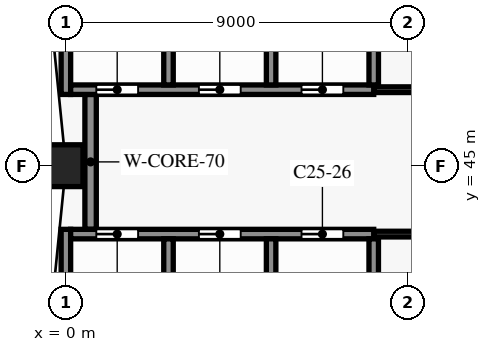
"""IFC4 building model, lengths in metres.
Left out: names, types, materials, properties, quantities, classifications, styles, units other than length and angle.
Written with IfcOpenShell. Run it as: python <this file> out.ifc"""

import sys

from ifc_helpers import new_model, si_unit, direction, frame, frame_2d, origin, origin_2d, place, context, subcontext, project, spatial, rectangle, extrude, element, fill, save


model = new_model("IFC4")
c1 = context("Model", 3, precision=1e-05, world=origin(), true_north=direction((0.0, 1.0)))
c2 = subcontext(c1, "Body", "Model", "MODEL_VIEW")
j1 = project(units=[si_unit("LENGTHUNIT", "METRE"), si_unit("PLANEANGLEUNIT", "RADIAN")], contexts=[c1])
p1 = place(None, origin())
s1 = spatial("IfcSite", under=j1, at=p1, CompositionType="ELEMENT")
p2 = place(p1, origin())
s2 = spatial("IfcBuilding", under=s1, at=p2, CompositionType="ELEMENT")
p3 = place(p2, frame((0.0, 0.0, 189.0)))
s3 = spatial("IfcBuildingStorey", under=s2, at=p3, CompositionType="ELEMENT", Elevation=189.0)
p4 = place(p3, frame((0.0, 45.0, 0.0), z_axis=(0.0, 0.0, 1.0), x_axis=(0.0, -1.0, 0.0)))
e1 = element("IfcColumn", 1, at=p4, inside=s3, PredefinedType="COLUMN", context=c2, shape_type="SweptSolid", body=[
    extrude(rectangle(XDim=0.9, YDim=1.1, at=origin_2d()), origin(), (0.0, 0.0, 1.0), 3.8),
])
p5 = place(p3, frame((8.1, 43.2, 0.0), z_axis=(0.0, 0.0, 1.0), x_axis=(1.0, 0.0, 0.0)))
e2 = element("IfcWall", 2, at=p5, inside=s3, PredefinedType="PARTITIONING", context=c2, shape_type="SweptSolid", body=[
    extrude(rectangle(XDim=16.125, YDim=0.15, at=frame_2d((8.062, 0.0))), origin(), (0.0, 0.0, 1.0), 3.35),
])
p6 = place(p5, frame((1.925, 0.0, 0.0)))
e3 = element("IfcOpeningElement", 3, at=p6, cuts=e2, PredefinedType="OPENING", context=c2, shape_type="SweptSolid", body=[
    extrude(rectangle(XDim=0.9, YDim=2.1, at=frame_2d((0.45, 1.05))), frame((0.0, 0.085, 0.0), z_axis=(0.0, -1.0, 0.0), x_axis=(1.0, 0.0, 0.0)), (0.0, 0.0, 1.0), 0.17),
])
p7 = place(p5, frame((10.025, 0.0, 0.0)))
e4 = element("IfcOpeningElement", 4, at=p7, cuts=e2, PredefinedType="OPENING", context=c2, shape_type="SweptSolid", body=[
    extrude(rectangle(XDim=0.9, YDim=2.1, at=frame_2d((0.45, 1.05))), frame((0.0, 0.085, 0.0), z_axis=(0.0, -1.0, 0.0), x_axis=(1.0, 0.0, 0.0)), (0.0, 0.0, 1.0), 0.17),
])
p8 = place(p3, frame((0.125, 43.2, 0.0), z_axis=(0.0, 0.0, 1.0), x_axis=(1.0, 0.0, 0.0)))
e5 = element("IfcWall", 5, at=p8, inside=s3, PredefinedType="SHEAR", context=c2, shape_type="SweptSolid", body=[
    extrude(rectangle(XDim=7.975, YDim=0.25, at=frame_2d((3.988, 0.0))), origin(), (0.0, 0.0, 1.0), 3.5),
])
p9 = place(p8, frame((0.675, 0.0, 0.0)))
e6 = element("IfcOpeningElement", 6, at=p9, cuts=e5, PredefinedType="OPENING", context=c2, shape_type="SweptSolid", body=[
    extrude(rectangle(XDim=1.1, YDim=2.1, at=frame_2d((0.55, 1.05))), frame((0.0, 0.135, 0.0), z_axis=(0.0, -1.0, 0.0), x_axis=(1.0, 0.0, 0.0)), (0.0, 0.0, 1.0), 0.27),
])
p10 = place(p8, frame((3.375, 0.0, 0.0)))
e7 = element("IfcOpeningElement", 7, at=p10, cuts=e5, PredefinedType="OPENING", context=c2, shape_type="SweptSolid", body=[
    extrude(rectangle(XDim=1.1, YDim=2.1, at=frame_2d((0.55, 1.05))), frame((0.0, 0.135, 0.0), z_axis=(0.0, -1.0, 0.0), x_axis=(1.0, 0.0, 0.0)), (0.0, 0.0, 1.0), 0.27),
])
p11 = place(p8, frame((6.075, 0.0, 0.0)))
e8 = element("IfcOpeningElement", 8, at=p11, cuts=e5, PredefinedType="OPENING", context=c2, shape_type="SweptSolid", body=[
    extrude(rectangle(XDim=1.1, YDim=2.1, at=frame_2d((0.55, 1.05))), frame((0.0, 0.135, 0.0), z_axis=(0.0, -1.0, 0.0), x_axis=(1.0, 0.0, 0.0)), (0.0, 0.0, 1.0), 0.27),
])
p12 = place(p3, frame((8.1, 47.0, 0.0), z_axis=(0.0, 0.0, 1.0), x_axis=(1.0, 0.0, 0.0)))
e9 = element("IfcWall", 9, at=p12, inside=s3, PredefinedType="PARTITIONING", context=c2, shape_type="SweptSolid", body=[
    extrude(rectangle(XDim=13.5, YDim=0.15, at=frame_2d((6.75, 0.0))), origin(), (0.0, 0.0, 1.0), 3.35),
])
p13 = place(p12, frame((1.525, 0.0, 0.0)))
e10 = element("IfcOpeningElement", 10, at=p13, cuts=e9, PredefinedType="OPENING", context=c2, shape_type="SweptSolid", body=[
    extrude(rectangle(XDim=0.9, YDim=2.1, at=frame_2d((0.45, 1.05))), frame((0.0, 0.085, 0.0), z_axis=(0.0, -1.0, 0.0), x_axis=(1.0, 0.0, 0.0)), (0.0, 0.0, 1.0), 0.17),
])
p14 = place(p12, frame((8.275, 0.0, 0.0)))
e11 = element("IfcOpeningElement", 11, at=p14, cuts=e9, PredefinedType="OPENING", context=c2, shape_type="SweptSolid", body=[
    extrude(rectangle(XDim=0.9, YDim=2.1, at=frame_2d((0.45, 1.05))), frame((0.0, 0.085, 0.0), z_axis=(0.0, -1.0, 0.0), x_axis=(1.0, 0.0, 0.0)), (0.0, 0.0, 1.0), 0.17),
])
p15 = place(p3, frame((0.125, 47.0, 0.0), z_axis=(0.0, 0.0, 1.0), x_axis=(1.0, 0.0, 0.0)))
e12 = element("IfcWall", 12, at=p15, inside=s3, PredefinedType="SHEAR", context=c2, shape_type="SweptSolid", body=[
    extrude(rectangle(XDim=7.975, YDim=0.25, at=frame_2d((3.988, 0.0))), origin(), (0.0, 0.0, 1.0), 3.5),
])
p16 = place(p15, frame((0.675, 0.0, 0.0)))
e13 = element("IfcOpeningElement", 13, at=p16, cuts=e12, PredefinedType="OPENING", context=c2, shape_type="SweptSolid", body=[
    extrude(rectangle(XDim=1.1, YDim=2.1, at=frame_2d((0.55, 1.05))), frame((0.0, 0.135, 0.0), z_axis=(0.0, -1.0, 0.0), x_axis=(1.0, 0.0, 0.0)), (0.0, 0.0, 1.0), 0.27),
])
p17 = place(p15, frame((3.375, 0.0, 0.0)))
e14 = element("IfcOpeningElement", 14, at=p17, cuts=e12, PredefinedType="OPENING", context=c2, shape_type="SweptSolid", body=[
    extrude(rectangle(XDim=1.1, YDim=2.1, at=frame_2d((0.55, 1.05))), frame((0.0, 0.135, 0.0), z_axis=(0.0, -1.0, 0.0), x_axis=(1.0, 0.0, 0.0)), (0.0, 0.0, 1.0), 0.27),
])
p18 = place(p15, frame((6.075, 0.0, 0.0)))
e15 = element("IfcOpeningElement", 15, at=p18, cuts=e12, PredefinedType="OPENING", context=c2, shape_type="SweptSolid", body=[
    extrude(rectangle(XDim=1.1, YDim=2.1, at=frame_2d((0.55, 1.05))), frame((0.0, 0.135, 0.0), z_axis=(0.0, -1.0, 0.0), x_axis=(1.0, 0.0, 0.0)), (0.0, 0.0, 1.0), 0.27),
])
p19 = place(p3, frame((0.0, 40.0, 0.0), z_axis=(0.0, 0.0, 1.0), x_axis=(0.0, 1.0, 0.0)))
e16 = element("IfcWall", 16, at=p19, inside=s3, PredefinedType="SHEAR", context=c2, shape_type="SweptSolid", body=[
    extrude(rectangle(XDim=3.325, YDim=0.25, at=frame_2d((1.663, 0.0))), origin(), (0.0, 0.0, 1.0), 3.5),
])
p20 = place(p3, frame((0.0, 46.875, 0.0), z_axis=(0.0, 0.0, 1.0), x_axis=(0.0, 1.0, 0.0)))
e17 = element("IfcWall", 17, at=p20, inside=s3, PredefinedType="SHEAR", context=c2, shape_type="SweptSolid", body=[
    extrude(rectangle(XDim=3.475, YDim=0.25, at=frame_2d((1.738, 0.0))), origin(), (0.0, 0.0, 1.0), 3.5),
])
p21 = place(p3, frame((0.65, 43.325, 0.0), z_axis=(0.0, 0.0, 1.0), x_axis=(0.0, 1.0, 0.0)))
e18 = element("IfcWall", 18, at=p21, inside=s3, PredefinedType="SHEAR", context=c2, shape_type="SweptSolid", body=[
    extrude(rectangle(XDim=3.55, YDim=0.3, at=frame_2d((1.775, 0.0))), origin(), (0.0, 0.0, 1.0), 3.5),
])
for number, where, z_axis, x_axis in (
    (19, (2.7, 40.125, 0.0), (0.0, 0.0, 1.0), (0.0, 1.0, 0.0)),
    (20, (2.7, 47.125, 0.0), (0.0, 0.0, 1.0), (0.0, 1.0, 0.0)),
    (21, (5.4, 40.125, 0.0), (0.0, 0.0, 1.0), (0.0, 1.0, 0.0)),
    (22, (5.4, 47.125, 0.0), (0.0, 0.0, 1.0), (0.0, 1.0, 0.0)),
    (23, (8.1, 40.125, 0.0), (0.0, 0.0, 1.0), (0.0, 1.0, 0.0)),
):
    element("IfcWall", number, at=place(p3, frame(where, z_axis=z_axis, x_axis=x_axis)), inside=s3, PredefinedType="SHEAR", context=c2, shape_type="SweptSolid", body=[
        extrude(rectangle(XDim=2.95, YDim=0.25, at=frame_2d((1.475, 0.0))), origin(), (0.0, 0.0, 1.0), 3.5),
    ])
p22 = place(p3, frame((8.1, 47.125, 0.0), z_axis=(0.0, 0.0, 1.0), x_axis=(0.0, 1.0, 0.0)))
e24 = element("IfcWall", 24, at=p22, inside=s3, PredefinedType="SHEAR", context=c2, shape_type="SweptSolid", body=[
    extrude(rectangle(XDim=3.075, YDim=0.25, at=frame_2d((1.538, 0.0))), origin(), (0.0, 0.0, 1.0), 3.5),
])
p23 = place(p9, origin())
e25 = element("IfcDoor", 25, at=p23, inside=s3, OperationType="DOUBLE_DOOR_SLIDING", PredefinedType="DOOR", context=c2, shape_type="SweptSolid", body=[
    extrude(rectangle(XDim=1.1, YDim=2.1, at=frame_2d((0.55, 1.05))), frame((0.0, 0.025, 0.0), z_axis=(0.0, -1.0, 0.0), x_axis=(1.0, 0.0, 0.0)), (0.0, 0.0, 1.0), 0.05),
])
fill(e6, e25)
p24 = place(p10, origin())
e26 = element("IfcDoor", 26, at=p24, inside=s3, OperationType="DOUBLE_DOOR_SLIDING", PredefinedType="DOOR", context=c2, shape_type="SweptSolid", body=[
    extrude(rectangle(XDim=1.1, YDim=2.1, at=frame_2d((0.55, 1.05))), frame((0.0, 0.025, 0.0), z_axis=(0.0, -1.0, 0.0), x_axis=(1.0, 0.0, 0.0)), (0.0, 0.0, 1.0), 0.05),
])
fill(e7, e26)
p25 = place(p11, origin())
e27 = element("IfcDoor", 27, at=p25, inside=s3, OperationType="DOUBLE_DOOR_SLIDING", PredefinedType="DOOR", context=c2, shape_type="SweptSolid", body=[
    extrude(rectangle(XDim=1.1, YDim=2.1, at=frame_2d((0.55, 1.05))), frame((0.0, 0.025, 0.0), z_axis=(0.0, -1.0, 0.0), x_axis=(1.0, 0.0, 0.0)), (0.0, 0.0, 1.0), 0.05),
])
fill(e8, e27)
p26 = place(p16, origin())
e28 = element("IfcDoor", 28, at=p26, inside=s3, OperationType="DOUBLE_DOOR_SLIDING", PredefinedType="DOOR", context=c2, shape_type="SweptSolid", body=[
    extrude(rectangle(XDim=1.1, YDim=2.1, at=frame_2d((0.55, 1.05))), frame((0.0, 0.025, 0.0), z_axis=(0.0, -1.0, 0.0), x_axis=(1.0, 0.0, 0.0)), (0.0, 0.0, 1.0), 0.05),
])
fill(e13, e28)
p27 = place(p17, origin())
e29 = element("IfcDoor", 29, at=p27, inside=s3, OperationType="DOUBLE_DOOR_SLIDING", PredefinedType="DOOR", context=c2, shape_type="SweptSolid", body=[
    extrude(rectangle(XDim=1.1, YDim=2.1, at=frame_2d((0.55, 1.05))), frame((0.0, 0.025, 0.0), z_axis=(0.0, -1.0, 0.0), x_axis=(1.0, 0.0, 0.0)), (0.0, 0.0, 1.0), 0.05),
])
fill(e14, e29)
p28 = place(p18, origin())
e30 = element("IfcDoor", 30, at=p28, inside=s3, OperationType="DOUBLE_DOOR_SLIDING", PredefinedType="DOOR", context=c2, shape_type="SweptSolid", body=[
    extrude(rectangle(XDim=1.1, YDim=2.1, at=frame_2d((0.55, 1.05))), frame((0.0, 0.025, 0.0), z_axis=(0.0, -1.0, 0.0), x_axis=(1.0, 0.0, 0.0)), (0.0, 0.0, 1.0), 0.05),
])
fill(e15, e30)
save(model, sys.argv[1])
